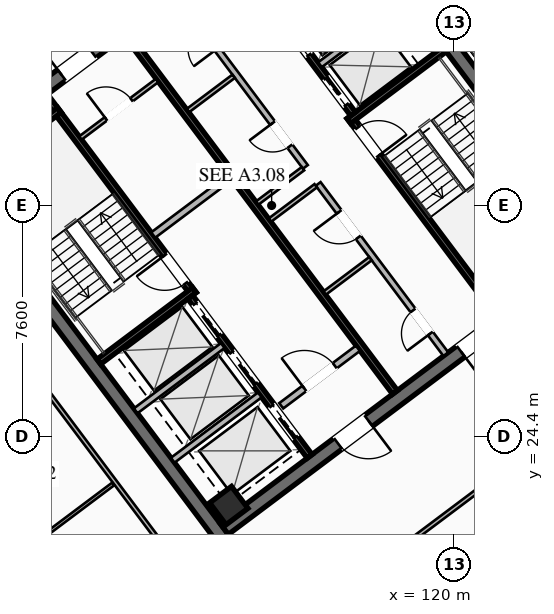
"""IFC4 building model, lengths in metres.
Left out: names, types, materials, properties, quantities, classifications, styles, units other than length and angle.
Written with IfcOpenShell. Run it as: python <this file> out.ifc"""

import sys

from ifc_helpers import new_model, si_unit, direction, frame, frame_2d, origin, origin_2d, place, context, subcontext, project, spatial, rectangle, hollow_rectangle, extrude, element, fill, save


model = new_model("IFC4")
c1 = context("Model", 3, precision=1e-05, world=origin(), true_north=direction((0.0, 1.0)))
c2 = subcontext(c1, "Body", "Model", "MODEL_VIEW")
j1 = project(units=[si_unit("LENGTHUNIT", "METRE"), si_unit("PLANEANGLEUNIT", "RADIAN")], contexts=[c1])
p1 = place(None, origin())
s1 = spatial("IfcSite", under=j1, at=p1, CompositionType="ELEMENT")
p2 = place(p1, origin())
s2 = spatial("IfcBuilding", under=s1, at=p2, CompositionType="ELEMENT")
p3 = place(p2, frame((0.0, 0.0, 207.75)))
s3 = spatial("IfcBuildingStorey", under=s2, at=p3, CompositionType="ELEMENT", Elevation=207.75)
for number, where, z_axis, x_axis in (
    (1, (112.396, 21.047, 0.0), (0.0, 0.0, 1.0), (-0.6, 0.8, 0.0)),
    (2, (115.604, 42.953, 0.0), (0.0, 0.0, 1.0), (0.6, -0.8, 0.0)),
):
    element("IfcWall", number, at=place(p3, frame(where, z_axis=z_axis, x_axis=x_axis)), inside=s3, PredefinedType="SHEAR", context=c2, shape_type="SweptSolid", body=[
        extrude(rectangle(XDim=15.6, YDim=0.45, at=frame_2d((7.8, 0.0))), origin(), (0.0, 0.0, 1.0), 3.55),
    ])
p4 = place(p3, frame((124.649, 30.518, 0.0), z_axis=(0.0, 0.0, 1.0), x_axis=(-0.8, -0.6, 0.0)))
e3 = element("IfcWall", 3, at=p4, inside=s3, PredefinedType="SHEAR", context=c2, shape_type="SweptSolid", body=[
    extrude(rectangle(XDim=15.26, YDim=0.45, at=frame_2d((7.63, 0.0))), origin(), (0.0, 0.0, 1.0), 3.55),
])
p5 = place(p4, frame((9.33, 0.0, 0.0)))
e4 = element("IfcOpeningElement", 4, at=p5, cuts=e3, PredefinedType="OPENING", context=c2, shape_type="SweptSolid", body=[
    extrude(rectangle(XDim=1.25, YDim=2.25, at=frame_2d((0.625, 1.125))), frame((0.0, 0.235, 0.0), z_axis=(0.0, -1.0, 0.0), x_axis=(1.0, 0.0, 0.0)), (0.0, 0.0, 1.0), 0.47),
])
p6 = place(p4, frame((4.28, 0.0, 0.0)))
e5 = element("IfcOpeningElement", 5, at=p6, cuts=e3, PredefinedType="OPENING", context=c2, shape_type="SweptSolid", body=[
    extrude(rectangle(XDim=1.25, YDim=2.25, at=frame_2d((0.625, 1.125))), frame((0.0, 0.235, 0.0), z_axis=(0.0, -1.0, 0.0), x_axis=(1.0, 0.0, 0.0)), (0.0, 0.0, 1.0), 0.47),
])
p7 = place(p3, frame((103.351, 33.482, 0.0), z_axis=(0.0, 0.0, 1.0), x_axis=(0.8, 0.6, 0.0)))
e6 = element("IfcWall", 6, at=p7, inside=s3, PredefinedType="SHEAR", context=c2, shape_type="SweptSolid", body=[
    extrude(rectangle(XDim=15.26, YDim=0.45, at=frame_2d((7.63, 0.0))), origin(), (0.0, 0.0, 1.0), 3.55),
])
p8 = place(p7, frame((4.68, 0.0, 0.0)))
e7 = element("IfcOpeningElement", 7, at=p8, cuts=e6, PredefinedType="OPENING", context=c2, shape_type="SweptSolid", body=[
    extrude(rectangle(XDim=1.25, YDim=2.25, at=frame_2d((0.625, 1.125))), frame((0.0, 0.235, 0.0), z_axis=(0.0, -1.0, 0.0), x_axis=(1.0, 0.0, 0.0)), (0.0, 0.0, 1.0), 0.47),
])
p9 = place(p7, frame((9.73, 0.0, 0.0)))
e8 = element("IfcOpeningElement", 8, at=p9, cuts=e6, PredefinedType="OPENING", context=c2, shape_type="SweptSolid", body=[
    extrude(rectangle(XDim=1.25, YDim=2.25, at=frame_2d((0.625, 1.125))), frame((0.0, 0.235, 0.0), z_axis=(0.0, -1.0, 0.0), x_axis=(1.0, 0.0, 0.0)), (0.0, 0.0, 1.0), 0.47),
])
p10 = place(p3, frame((112.59, 22.13, 0.0), z_axis=(0.0, 0.0, 1.0), x_axis=(0.799999996291, 0.600000004945, 0.0)))
e9 = element("IfcColumn", 9, at=p10, inside=s3, PredefinedType="COLUMN", context=c2, shape_type="SweptSolid", body=[
    extrude(hollow_rectangle(XDim=0.9, YDim=0.9, WallThickness=0.04, at=origin_2d()), origin(), (0.0, 0.0, 1.0), 3.37),
])
p11 = place(p3, frame((111.44, 29.08, 0.0), z_axis=(0.0, 0.0, 1.0), x_axis=(-0.59999041401, 0.800007189403, 0.0)))
e10 = element("IfcWall", 10, at=p11, inside=s3, PredefinedType="SHEAR", context=c2, shape_type="SweptSolid", body=[
    extrude(rectangle(XDim=8.15, YDim=0.2, at=frame_2d((4.075, 0.0))), origin(), (0.0, 0.0, 1.0), 3.37),
])
p12 = place(p11, frame((0.45, 0.0, 0.0)))
e11 = element("IfcOpeningElement", 11, at=p12, cuts=e10, PredefinedType="OPENING", context=c2, shape_type="SweptSolid", body=[
    extrude(rectangle(XDim=1.15, YDim=2.2, at=frame_2d((0.575, 1.1))), frame((0.0, 0.11, 0.0), z_axis=(0.0, -1.0, 0.0), x_axis=(1.0, 0.0, 0.0)), (0.0, 0.0, 1.0), 0.22),
])
for number, where, z_axis, x_axis in (
    (12, (108.316, 26.862, 0.0), (0.0, 0.0, 1.0), (0.8, 0.6, 0.0)),
    (13, (103.876, 32.782, 0.0), (0.0, 0.0, 1.0), (0.8, 0.6, 0.0)),
):
    element("IfcWall", number, at=place(p3, frame(where, z_axis=z_axis, x_axis=x_axis)), inside=s3, PredefinedType="SHEAR", context=c2, shape_type="SweptSolid", body=[
        extrude(rectangle(XDim=3.93, YDim=0.2, at=frame_2d((1.965, 0.0))), origin(), (0.0, 0.0, 1.0), 3.37),
    ])
p13 = place(p3, frame((116.56, 34.92, 0.0), z_axis=(0.0, 0.0, 1.0), x_axis=(0.59999041401, -0.800007189403, 0.0)))
e14 = element("IfcWall", 14, at=p13, inside=s3, PredefinedType="SHEAR", context=c2, shape_type="SweptSolid", body=[
    extrude(rectangle(XDim=8.15, YDim=0.2, at=frame_2d((4.075, 0.0))), origin(), (0.0, 0.0, 1.0), 3.37),
])
p14 = place(p13, frame((0.45, 0.0, 0.0)))
e15 = element("IfcOpeningElement", 15, at=p14, cuts=e14, PredefinedType="OPENING", context=c2, shape_type="SweptSolid", body=[
    extrude(rectangle(XDim=1.15, YDim=2.2, at=frame_2d((0.575, 1.1))), frame((0.0, 0.11, 0.0), z_axis=(0.0, -1.0, 0.0), x_axis=(1.0, 0.0, 0.0)), (0.0, 0.0, 1.0), 0.22),
])
p15 = place(p3, frame((116.54, 34.78, 0.0), z_axis=(0.0, 0.0, 1.0), x_axis=(0.800014909178, 0.599980120581, 0.0)))
e16 = element("IfcWall", 16, at=p15, inside=s3, PredefinedType="SHEAR", context=c2, shape_type="SweptSolid", body=[
    extrude(rectangle(XDim=3.93, YDim=0.2, at=frame_2d((1.965, 0.0))), origin(), (0.0, 0.0, 1.0), 3.37),
])
p16 = place(p3, frame((118.058, 25.856, 0.0), z_axis=(0.0, 0.0, 1.0), x_axis=(-0.600002657301, 0.799998007018, 0.0)))
e17 = element("IfcWall", 17, at=p16, inside=s3, PredefinedType="SHEAR", context=c2, shape_type="SweptSolid", body=[
    extrude(rectangle(XDim=14.7, YDim=0.2, at=frame_2d((7.35, 0.0))), origin(), (0.0, 0.0, 1.0), 3.37),
])
p17 = place(p3, frame((110.104, 31.028, 0.0), z_axis=(0.0, 0.0, 1.0), x_axis=(0.800018601094, 0.59997519774, 0.0)))
e18 = element("IfcWall", 18, at=p17, inside=s3, PredefinedType="SOLIDWALL", context=c2, shape_type="SweptSolid", body=[
    extrude(rectangle(XDim=3.15, YDim=0.22, at=frame_2d((1.575, 0.0))), origin(), (0.0, 0.0, 1.0), 2.723),
])
p18 = place(p3, frame((114.316, 25.412, 0.0), z_axis=(0.0, 0.0, 1.0), x_axis=(0.800018601094, 0.59997519774, 0.0)))
e19 = element("IfcWall", 19, at=p18, inside=s3, PredefinedType="SOLIDWALL", context=c2, shape_type="SweptSolid", body=[
    extrude(rectangle(XDim=3.15, YDim=0.22, at=frame_2d((1.575, 0.0))), origin(), (0.0, 0.0, 1.0), 2.723),
])
p19 = place(p18, frame((0.95, 0.0, 0.0)))
e20 = element("IfcOpeningElement", 20, at=p19, cuts=e19, PredefinedType="OPENING", context=c2, shape_type="SweptSolid", body=[
    extrude(rectangle(XDim=1.25, YDim=2.25, at=frame_2d((0.625, 1.125))), frame((0.0, 0.12, 0.0), z_axis=(0.0, -1.0, 0.0), x_axis=(1.0, 0.0, 0.0)), (0.0, 0.0, 1.0), 0.24),
])
p20 = place(p3, frame((115.25, 23.75, 0.0), z_axis=(0.0, 0.0, 1.0), x_axis=(-0.599994036198, 0.800004472816, 0.0)))
e21 = element("IfcWall", 21, at=p20, inside=s3, PredefinedType="SHEAR", context=c2, shape_type="SweptSolid", body=[
    extrude(rectangle(XDim=6.55, YDim=0.2, at=frame_2d((3.275, 0.0))), origin(), (0.0, 0.0, 1.0), 3.37),
])
p21 = place(p20, frame((4.975, 0.0, 0.0)))
e22 = element("IfcOpeningElement", 22, at=p21, cuts=e21, PredefinedType="OPENING", context=c2, shape_type="SweptSolid", body=[
    extrude(rectangle(XDim=1.3, YDim=2.25, at=frame_2d((0.65, 1.125))), frame((0.0, 0.11, 0.0), z_axis=(0.0, -1.0, 0.0), x_axis=(1.0, 0.0, 0.0)), (0.0, 0.0, 1.0), 0.22),
])
p22 = place(p20, frame((2.975, 0.0, 0.0)))
e23 = element("IfcOpeningElement", 23, at=p22, cuts=e21, PredefinedType="OPENING", context=c2, shape_type="SweptSolid", body=[
    extrude(rectangle(XDim=1.3, YDim=2.25, at=frame_2d((0.65, 1.125))), frame((0.0, 0.11, 0.0), z_axis=(0.0, -1.0, 0.0), x_axis=(1.0, 0.0, 0.0)), (0.0, 0.0, 1.0), 0.22),
])
p23 = place(p20, frame((0.775, 0.0, 0.0)))
e24 = element("IfcOpeningElement", 24, at=p23, cuts=e21, PredefinedType="OPENING", context=c2, shape_type="SweptSolid", body=[
    extrude(rectangle(XDim=1.3, YDim=2.25, at=frame_2d((0.65, 1.125))), frame((0.0, 0.11, 0.0), z_axis=(0.0, -1.0, 0.0), x_axis=(1.0, 0.0, 0.0)), (0.0, 0.0, 1.0), 0.22),
])
for number, where, z_axis, x_axis in (
    (25, (110.746, 23.622, 0.0), (0.0, 0.0, 1.0), (0.8, 0.6, 0.0)),
    (26, (109.528, 25.246, 0.0), (0.0, 0.0, 1.0), (0.8, 0.6, 0.0)),
):
    element("IfcWall", number, at=place(p3, frame(where, z_axis=z_axis, x_axis=x_axis)), inside=s3, PredefinedType="SOLIDWALL", context=c2, shape_type="SweptSolid", body=[
        extrude(rectangle(XDim=3.58, YDim=0.2, at=frame_2d((1.79, 0.0))), origin(), (0.0, 0.0, 1.0), 3.37),
    ])
p24 = place(p3, frame((112.75, 40.25, 0.0), z_axis=(0.0, 0.0, 1.0), x_axis=(0.599994036198, -0.800004472816, 0.0)))
e27 = element("IfcWall", 27, at=p24, inside=s3, PredefinedType="SHEAR", context=c2, shape_type="SweptSolid", body=[
    extrude(rectangle(XDim=6.55, YDim=0.2, at=frame_2d((3.275, 0.0))), origin(), (0.0, 0.0, 1.0), 3.37),
])
p25 = place(p24, frame((5.075, 0.0, 0.0)))
e28 = element("IfcOpeningElement", 28, at=p25, cuts=e27, PredefinedType="OPENING", context=c2, shape_type="SweptSolid", body=[
    extrude(rectangle(XDim=1.1, YDim=2.2, at=frame_2d((0.55, 1.1))), frame((0.0, 0.11, 0.0), z_axis=(0.0, -1.0, 0.0), x_axis=(1.0, 0.0, 0.0)), (0.0, 0.0, 1.0), 0.22),
])
p26 = place(p24, frame((3.025, 0.0, 0.0)))
e29 = element("IfcOpeningElement", 29, at=p26, cuts=e27, PredefinedType="OPENING", context=c2, shape_type="SweptSolid", body=[
    extrude(rectangle(XDim=1.1, YDim=2.2, at=frame_2d((0.55, 1.1))), frame((0.0, 0.11, 0.0), z_axis=(0.0, -1.0, 0.0), x_axis=(1.0, 0.0, 0.0)), (0.0, 0.0, 1.0), 0.22),
])
p27 = place(p24, frame((1.025, 0.0, 0.0)))
e30 = element("IfcOpeningElement", 30, at=p27, cuts=e27, PredefinedType="OPENING", context=c2, shape_type="SweptSolid", body=[
    extrude(rectangle(XDim=1.1, YDim=2.2, at=frame_2d((0.55, 1.1))), frame((0.0, 0.11, 0.0), z_axis=(0.0, -1.0, 0.0), x_axis=(1.0, 0.0, 0.0)), (0.0, 0.0, 1.0), 0.22),
])
p28 = place(p3, frame((115.59, 36.63, 0.0), z_axis=(0.0, 0.0, 1.0), x_axis=(0.799975449747, 0.600032732276, 0.0)))
e31 = element("IfcWall", 31, at=p28, inside=s3, PredefinedType="SOLIDWALL", context=c2, shape_type="SweptSolid", body=[
    extrude(rectangle(XDim=3.58, YDim=0.2, at=frame_2d((1.79, 0.0))), origin(), (0.0, 0.0, 1.0), 3.37),
])
p29 = place(p3, frame((107.71, 34.22, 0.0), z_axis=(0.0, 0.0, 1.0), x_axis=(0.799981399002, 0.60002480053, 0.0)))
e32 = element("IfcWall", 32, at=p29, inside=s3, PredefinedType="PARTITIONING", context=c2, shape_type="SweptSolid", body=[
    extrude(rectangle(XDim=3.15, YDim=0.135, at=frame_2d((1.575, 0.0))), origin(), (0.0, 0.0, 1.0), 2.723),
])
p30 = place(p29, frame((1.05, 0.0, 0.0)))
e33 = element("IfcOpeningElement", 33, at=p30, cuts=e32, PredefinedType="OPENING", context=c2, shape_type="SweptSolid", body=[
    extrude(rectangle(XDim=1.05, YDim=2.2, at=frame_2d((0.525, 1.1))), frame((0.0, 0.077, 0.0), z_axis=(0.0, -1.0, 0.0), x_axis=(1.0, 0.0, 0.0)), (0.0, 0.0, 1.0), 0.155),
])
p31 = place(p3, frame((119.73, 27.11, 0.0), z_axis=(0.0, 0.0, 1.0), x_axis=(-0.600005580459, 0.799995814625, 0.0)))
e34 = element("IfcWall", 34, at=p31, inside=s3, PredefinedType="SOLIDWALL", context=c2, shape_type="SweptSolid", body=[
    extrude(rectangle(XDim=7.0, YDim=0.2, at=frame_2d((3.5, 0.0))), origin(), (0.0, 0.0, 1.0), 2.723),
])
p32 = place(p31, frame((0.85, 0.0, 0.0)))
e35 = element("IfcOpeningElement", 35, at=p32, cuts=e34, PredefinedType="OPENING", context=c2, shape_type="SweptSolid", body=[
    extrude(rectangle(XDim=0.95, YDim=2.05, at=frame_2d((0.475, 1.025))), frame((0.0, 0.11, 0.0), z_axis=(0.0, -1.0, 0.0), x_axis=(1.0, 0.0, 0.0)), (0.0, 0.0, 1.0), 0.22),
])
p33 = place(p31, frame((4.8, 0.0, 0.0)))
e36 = element("IfcOpeningElement", 36, at=p33, cuts=e34, PredefinedType="OPENING", context=c2, shape_type="SweptSolid", body=[
    extrude(rectangle(XDim=1.05, YDim=2.2, at=frame_2d((0.525, 1.1))), frame((0.0, 0.11, 0.0), z_axis=(0.0, -1.0, 0.0), x_axis=(1.0, 0.0, 0.0)), (0.0, 0.0, 1.0), 0.22),
])
for number, where, z_axis, x_axis in (
    (37, (113.946, 31.522, 0.0), (0.0, 0.0, 1.0), (0.8, 0.6, 0.0)),
    (38, (115.746, 29.122, 0.0), (0.0, 0.0, 1.0), (0.8, 0.6, 0.0)),
):
    element("IfcWall", number, at=place(p3, frame(where, z_axis=z_axis, x_axis=x_axis)), inside=s3, PredefinedType="PARTITIONING", context=c2, shape_type="SweptSolid", body=[
        extrude(rectangle(XDim=1.88, YDim=0.135, at=frame_2d((0.94, 0.0))), origin(), (0.0, 0.0, 1.0), 2.723),
    ])
p34 = place(p3, frame((115.11, 33.27, 0.0), z_axis=(0.0, 0.0, 1.0), x_axis=(-0.600011160345, 0.79999162962, 0.0)))
e39 = element("IfcWall", 39, at=p34, inside=s3, PredefinedType="SOLIDWALL", context=c2, shape_type="SweptSolid", body=[
    extrude(rectangle(XDim=7.0, YDim=0.2, at=frame_2d((3.5, 0.0))), origin(), (0.0, 0.0, 1.0), 2.723),
])
p35 = place(p34, frame((0.85, 0.0, 0.0)))
e40 = element("IfcOpeningElement", 40, at=p35, cuts=e39, PredefinedType="OPENING", context=c2, shape_type="SweptSolid", body=[
    extrude(rectangle(XDim=0.95, YDim=2.05, at=frame_2d((0.475, 1.025))), frame((0.0, 0.11, 0.0), z_axis=(0.0, -1.0, 0.0), x_axis=(1.0, 0.0, 0.0)), (0.0, 0.0, 1.0), 0.22),
])
p36 = place(p34, frame((4.85, 0.0, 0.0)))
e41 = element("IfcOpeningElement", 41, at=p36, cuts=e39, PredefinedType="OPENING", context=c2, shape_type="SweptSolid", body=[
    extrude(rectangle(XDim=0.95, YDim=2.05, at=frame_2d((0.475, 1.025))), frame((0.0, 0.11, 0.0), z_axis=(0.0, -1.0, 0.0), x_axis=(1.0, 0.0, 0.0)), (0.0, 0.0, 1.0), 0.22),
])
p37 = place(p3, frame((113.526, 32.082, 0.0), z_axis=(0.0, 0.0, 1.0), x_axis=(0.800046745961, 0.599937666993, 0.0)))
e42 = element("IfcWall", 42, at=p37, inside=s3, PredefinedType="PARTITIONING", context=c2, shape_type="SweptSolid", body=[
    extrude(rectangle(XDim=1.88, YDim=0.135, at=frame_2d((0.94, 0.0))), origin(), (0.0, 0.0, 1.0), 2.723),
])
p38 = place(p3, frame((111.246, 35.122, 0.0), z_axis=(0.0, 0.0, 1.0), x_axis=(0.8, 0.6, 0.0)))
e43 = element("IfcWall", 43, at=p38, inside=s3, PredefinedType="PARTITIONING", context=c2, shape_type="SweptSolid", body=[
    extrude(rectangle(XDim=1.88, YDim=0.135, at=frame_2d((0.94, 0.0))), origin(), (0.0, 0.0, 1.0), 2.723),
])
p39 = place(p3, frame((100.756, 33.692, 0.0), z_axis=(0.0, 0.0, 1.0), x_axis=(0.799998716732, 0.60000171102, 0.0)))
e44 = element("IfcWall", 44, at=p39, inside=s3, PredefinedType="PARTITIONING", context=c2, shape_type="SweptSolid", body=[
    extrude(rectangle(XDim=22.83, YDim=0.135, at=frame_2d((11.415, 0.0))), origin(), (0.0, 0.0, 1.0), 2.723),
])
p40 = place(p39, frame((9.38, 0.0, 0.0)))
e45 = element("IfcOpeningElement", 45, at=p40, cuts=e44, PredefinedType="OPENING", context=c2, shape_type="SweptSolid", body=[
    extrude(rectangle(XDim=0.95, YDim=2.05, at=frame_2d((0.475, 1.025))), frame((0.0, 0.077, 0.0), z_axis=(0.0, -1.0, 0.0), x_axis=(1.0, 0.0, 0.0)), (0.0, 0.0, 1.0), 0.155),
])
p41 = place(p39, frame((21.58, 0.0, 0.0)))
e46 = element("IfcOpeningElement", 46, at=p41, cuts=e44, PredefinedType="OPENING", context=c2, shape_type="SweptSolid", body=[
    extrude(rectangle(XDim=0.95, YDim=2.05, at=frame_2d((0.475, 1.025))), frame((0.0, 0.077, 0.0), z_axis=(0.0, -1.0, 0.0), x_axis=(1.0, 0.0, 0.0)), (0.0, 0.0, 1.0), 0.155),
])
p42 = place(p3, frame((124.462, 25.384, 0.0), z_axis=(0.0, 0.0, 1.0), x_axis=(-0.799997904343, -0.6000027942, 0.0)))
e47 = element("IfcWall", 47, at=p42, inside=s3, PredefinedType="PARTITIONING", context=c2, shape_type="SweptSolid", body=[
    extrude(rectangle(XDim=13.98, YDim=0.135, at=frame_2d((6.99, 0.0))), origin(), (0.0, 0.0, 1.0), 2.723),
])
p43 = place(p42, frame((3.635, 0.0, 0.0)))
e48 = element("IfcOpeningElement", 48, at=p43, cuts=e47, PredefinedType="OPENING", context=c2, shape_type="SweptSolid", body=[
    extrude(rectangle(XDim=0.95, YDim=2.05, at=frame_2d((0.475, 1.025))), frame((0.0, 0.077, 0.0), z_axis=(0.0, -1.0, 0.0), x_axis=(1.0, 0.0, 0.0)), (0.0, 0.0, 1.0), 0.155),
])
p44 = place(p3, frame((113.23, 17.06, 0.0), z_axis=(0.0, 0.0, 1.0), x_axis=(-0.600003772342, 0.79999717073, 0.0)))
e49 = element("IfcWall", 49, at=p44, inside=s3, PredefinedType="PARTITIONING", context=c2, shape_type="SweptSolid", body=[
    extrude(rectangle(XDim=20.71, YDim=0.135, at=frame_2d((10.355, 0.0))), origin(), (0.0, 0.0, 1.0), 2.723),
])
p45 = place(p44, frame((0.3, 0.0, 0.0)))
e50 = element("IfcOpeningElement", 50, at=p45, cuts=e49, PredefinedType="OPENING", context=c2, shape_type="SweptSolid", body=[
    extrude(rectangle(XDim=0.95, YDim=2.05, at=frame_2d((0.475, 1.025))), frame((0.0, 0.077, 0.0), z_axis=(0.0, -1.0, 0.0), x_axis=(1.0, 0.0, 0.0)), (0.0, 0.0, 1.0), 0.155),
])
p46 = place(p44, frame((11.272, 0.0, 0.0)))
e51 = element("IfcOpeningElement", 51, at=p46, cuts=e49, PredefinedType="OPENING", context=c2, shape_type="SweptSolid", body=[
    extrude(rectangle(XDim=0.95, YDim=2.05, at=frame_2d((0.475, 1.025))), frame((0.0, 0.077, 0.0), z_axis=(0.0, -1.0, 0.0), x_axis=(1.0, 0.0, 0.0)), (0.0, 0.0, 1.0), 0.155),
])
p47 = place(p44, frame((19.46, 0.0, 0.0)))
e52 = element("IfcOpeningElement", 52, at=p47, cuts=e49, PredefinedType="OPENING", context=c2, shape_type="SweptSolid", body=[
    extrude(rectangle(XDim=0.95, YDim=2.05, at=frame_2d((0.475, 1.025))), frame((0.0, 0.077, 0.0), z_axis=(0.0, -1.0, 0.0), x_axis=(1.0, 0.0, 0.0)), (0.0, 0.0, 1.0), 0.155),
])
p48 = place(p3, frame((104.136, 19.352, 0.0), z_axis=(0.0, 0.0, 1.0), x_axis=(0.800005033825, 0.599993288175, 0.0)))
e53 = element("IfcWall", 53, at=p48, inside=s3, PredefinedType="PARTITIONING", context=c2, shape_type="SweptSolid", body=[
    extrude(rectangle(XDim=5.82, YDim=0.11, at=frame_2d((2.91, 0.0))), origin(), (0.0, 0.0, 1.0), 2.723),
])
p49 = place(p8, origin())
e54 = element("IfcDoor", 54, at=p49, inside=s3, OperationType="SINGLE_SWING_LEFT", PredefinedType="DOOR", context=c2, shape_type="SweptSolid", body=[
    extrude(rectangle(XDim=1.25, YDim=2.25, at=frame_2d((0.625, 1.125))), frame((0.0, 0.025, 0.0), z_axis=(0.0, -1.0, 0.0), x_axis=(1.0, 0.0, 0.0)), (0.0, 0.0, 1.0), 0.05),
])
fill(e7, e54)
p50 = place(p5, origin())
e55 = element("IfcDoor", 55, at=p50, inside=s3, OperationType="SINGLE_SWING_LEFT", PredefinedType="DOOR", context=c2, shape_type="SweptSolid", body=[
    extrude(rectangle(XDim=1.25, YDim=2.25, at=frame_2d((0.625, 1.125))), frame((0.0, 0.025, 0.0), z_axis=(0.0, -1.0, 0.0), x_axis=(1.0, 0.0, 0.0)), (0.0, 0.0, 1.0), 0.05),
])
fill(e4, e55)
p51 = place(p6, origin())
e56 = element("IfcDoor", 56, at=p51, inside=s3, OperationType="SINGLE_SWING_RIGHT", PredefinedType="DOOR", context=c2, shape_type="SweptSolid", body=[
    extrude(rectangle(XDim=1.25, YDim=2.25, at=frame_2d((0.625, 1.125))), frame((0.0, 0.025, 0.0), z_axis=(0.0, -1.0, 0.0), x_axis=(1.0, 0.0, 0.0)), (0.0, 0.0, 1.0), 0.05),
])
fill(e5, e56)
p52 = place(p12, origin())
e57 = element("IfcDoor", 57, at=p52, inside=s3, OperationType="SINGLE_SWING_RIGHT", PredefinedType="DOOR", context=c2, shape_type="SweptSolid", body=[
    extrude(rectangle(XDim=1.15, YDim=2.2, at=frame_2d((0.575, 1.1))), frame((0.0, 0.025, 0.0), z_axis=(0.0, -1.0, 0.0), x_axis=(1.0, 0.0, 0.0)), (0.0, 0.0, 1.0), 0.05),
])
fill(e11, e57)
p53 = place(p14, origin())
e58 = element("IfcDoor", 58, at=p53, inside=s3, OperationType="SINGLE_SWING_RIGHT", PredefinedType="DOOR", context=c2, shape_type="SweptSolid", body=[
    extrude(rectangle(XDim=1.15, YDim=2.2, at=frame_2d((0.575, 1.1))), frame((0.0, 0.025, 0.0), z_axis=(0.0, -1.0, 0.0), x_axis=(1.0, 0.0, 0.0)), (0.0, 0.0, 1.0), 0.05),
])
fill(e15, e58)
p54 = place(p19, origin())
e59 = element("IfcDoor", 59, at=p54, inside=s3, OperationType="SINGLE_SWING_LEFT", PredefinedType="DOOR", context=c2, shape_type="SweptSolid", body=[
    extrude(rectangle(XDim=1.25, YDim=2.25, at=frame_2d((0.625, 1.125))), frame((0.0, 0.025, 0.0), z_axis=(0.0, -1.0, 0.0), x_axis=(1.0, 0.0, 0.0)), (0.0, 0.0, 1.0), 0.05),
])
fill(e20, e59)
p55 = place(p30, origin())
e60 = element("IfcDoor", 60, at=p55, inside=s3, OperationType="SINGLE_SWING_LEFT", PredefinedType="DOOR", context=c2, shape_type="SweptSolid", body=[
    extrude(rectangle(XDim=1.05, YDim=2.2, at=frame_2d((0.525, 1.1))), frame((0.0, 0.025, 0.0), z_axis=(0.0, -1.0, 0.0), x_axis=(1.0, 0.0, 0.0)), (0.0, 0.0, 1.0), 0.05),
])
fill(e33, e60)
p56 = place(p32, origin())
e61 = element("IfcDoor", 61, at=p56, inside=s3, OperationType="SINGLE_SWING_LEFT", PredefinedType="DOOR", context=c2, shape_type="SweptSolid", body=[
    extrude(rectangle(XDim=0.95, YDim=2.05, at=frame_2d((0.475, 1.025))), frame((0.0, 0.025, 0.0), z_axis=(0.0, -1.0, 0.0), x_axis=(1.0, 0.0, 0.0)), (0.0, 0.0, 1.0), 0.05),
])
fill(e35, e61)
p57 = place(p33, origin())
e62 = element("IfcDoor", 62, at=p57, inside=s3, OperationType="SINGLE_SWING_RIGHT", PredefinedType="DOOR", context=c2, shape_type="SweptSolid", body=[
    extrude(rectangle(XDim=1.05, YDim=2.2, at=frame_2d((0.525, 1.1))), frame((0.0, 0.025, 0.0), z_axis=(0.0, -1.0, 0.0), x_axis=(1.0, 0.0, 0.0)), (0.0, 0.0, 1.0), 0.05),
])
fill(e36, e62)
p58 = place(p35, origin())
e63 = element("IfcDoor", 63, at=p58, inside=s3, OperationType="SINGLE_SWING_RIGHT", PredefinedType="DOOR", context=c2, shape_type="SweptSolid", body=[
    extrude(rectangle(XDim=0.95, YDim=2.05, at=frame_2d((0.475, 1.025))), frame((0.0, 0.025, 0.0), z_axis=(0.0, -1.0, 0.0), x_axis=(1.0, 0.0, 0.0)), (0.0, 0.0, 1.0), 0.05),
])
fill(e40, e63)
p59 = place(p21, origin())
e64 = element("IfcDoor", 64, at=p59, inside=s3, OperationType="SLIDING_TO_LEFT", PredefinedType="DOOR", context=c2, shape_type="SweptSolid", body=[
    extrude(rectangle(XDim=1.3, YDim=2.25, at=frame_2d((0.65, 1.125))), frame((0.0, 0.025, 0.0), z_axis=(0.0, -1.0, 0.0), x_axis=(1.0, 0.0, 0.0)), (0.0, 0.0, 1.0), 0.05),
])
fill(e22, e64)
p60 = place(p22, origin())
e65 = element("IfcDoor", 65, at=p60, inside=s3, OperationType="SLIDING_TO_LEFT", PredefinedType="DOOR", context=c2, shape_type="SweptSolid", body=[
    extrude(rectangle(XDim=1.3, YDim=2.25, at=frame_2d((0.65, 1.125))), frame((0.0, 0.025, 0.0), z_axis=(0.0, -1.0, 0.0), x_axis=(1.0, 0.0, 0.0)), (0.0, 0.0, 1.0), 0.05),
])
fill(e23, e65)
p61 = place(p23, origin())
e66 = element("IfcDoor", 66, at=p61, inside=s3, OperationType="SLIDING_TO_LEFT", PredefinedType="DOOR", context=c2, shape_type="SweptSolid", body=[
    extrude(rectangle(XDim=1.3, YDim=2.25, at=frame_2d((0.65, 1.125))), frame((0.0, 0.025, 0.0), z_axis=(0.0, -1.0, 0.0), x_axis=(1.0, 0.0, 0.0)), (0.0, 0.0, 1.0), 0.05),
])
fill(e24, e66)
p62 = place(p25, origin())
e67 = element("IfcDoor", 67, at=p62, inside=s3, OperationType="SLIDING_TO_LEFT", PredefinedType="DOOR", context=c2, shape_type="SweptSolid", body=[
    extrude(rectangle(XDim=1.1, YDim=2.2, at=frame_2d((0.55, 1.1))), frame((0.0, 0.025, 0.0), z_axis=(0.0, -1.0, 0.0), x_axis=(1.0, 0.0, 0.0)), (0.0, 0.0, 1.0), 0.05),
])
fill(e28, e67)
p63 = place(p26, origin())
e68 = element("IfcDoor", 68, at=p63, inside=s3, OperationType="SLIDING_TO_LEFT", PredefinedType="DOOR", context=c2, shape_type="SweptSolid", body=[
    extrude(rectangle(XDim=1.1, YDim=2.2, at=frame_2d((0.55, 1.1))), frame((0.0, 0.025, 0.0), z_axis=(0.0, -1.0, 0.0), x_axis=(1.0, 0.0, 0.0)), (0.0, 0.0, 1.0), 0.05),
])
fill(e29, e68)
save(model, sys.argv[1])
